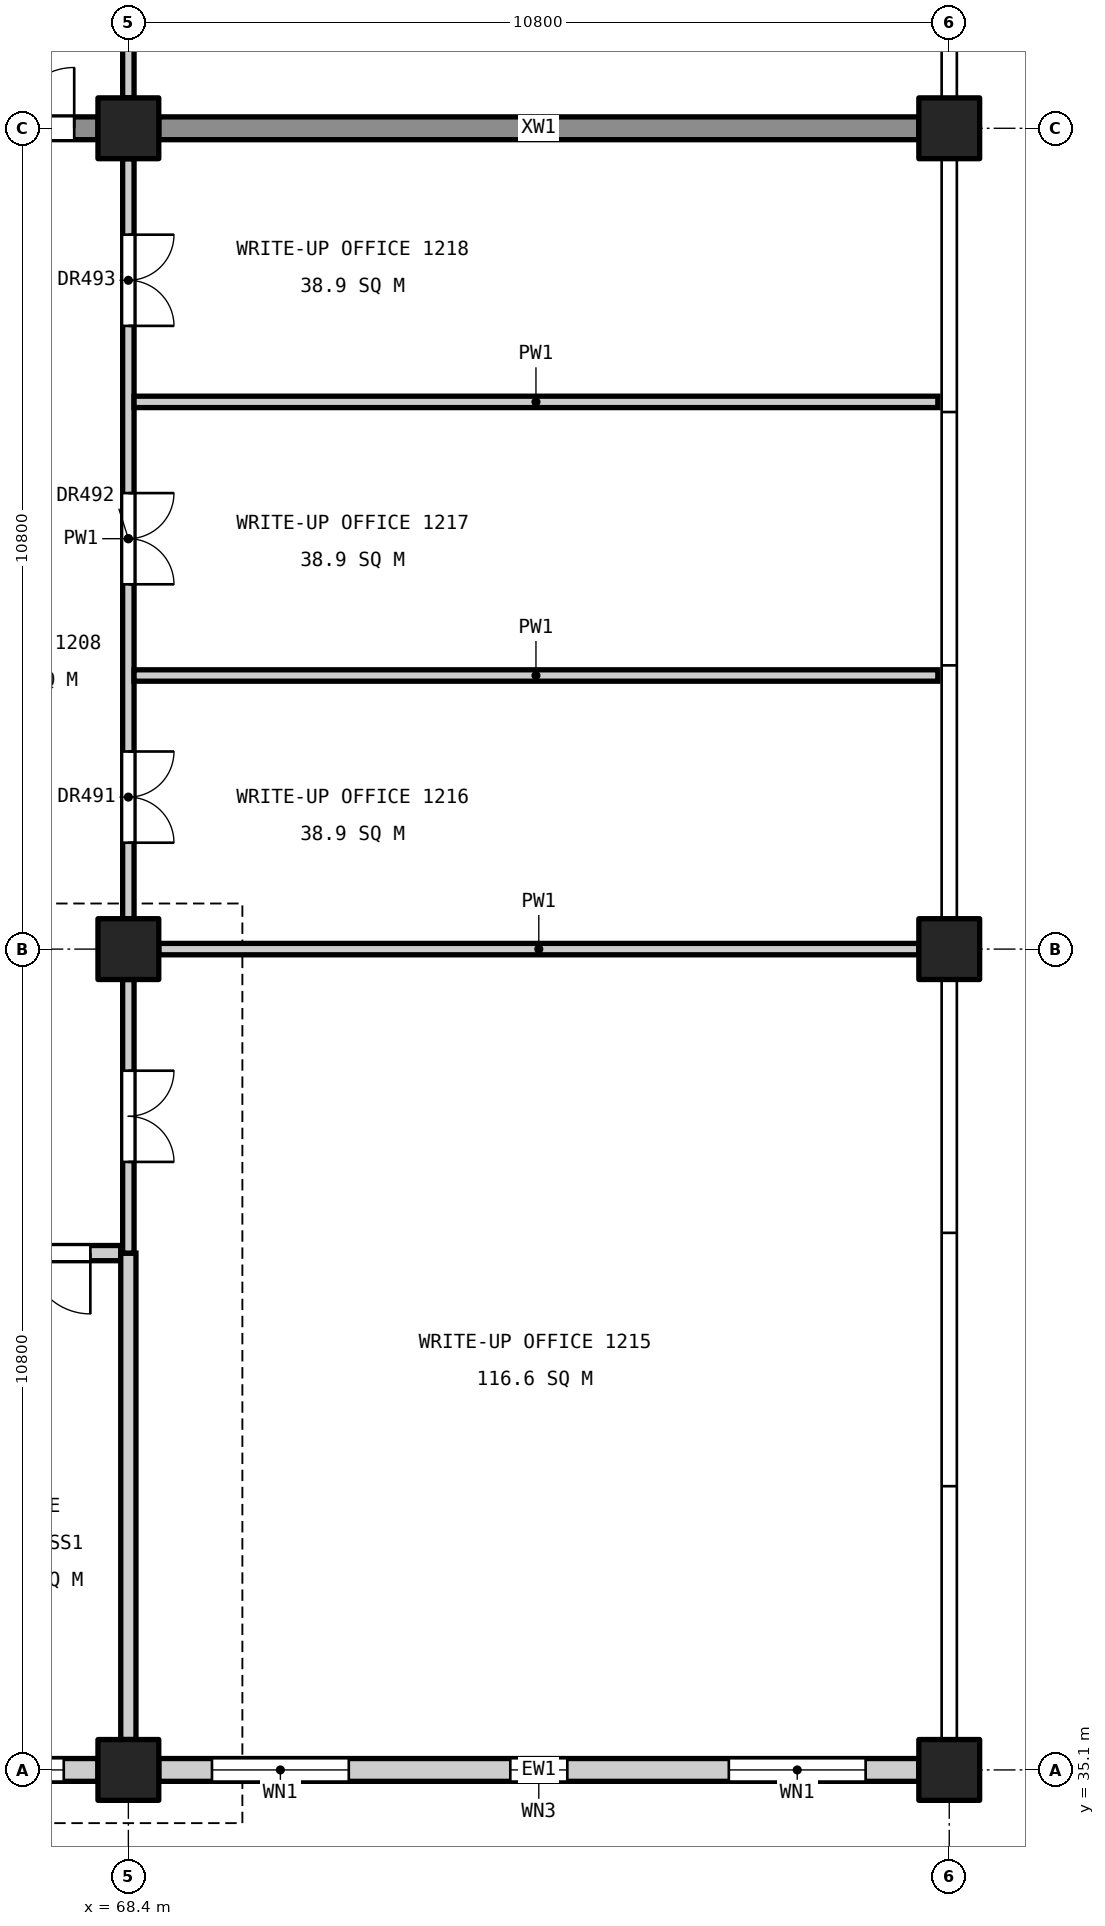
"""IFC4 building model, lengths in metres.
Left out: names, types, materials, properties, quantities, classifications, styles, units other than length and angle.
Written with IfcOpenShell. Run it as: python <this file> out.ifc"""

import sys

from ifc_helpers import new_model, si_unit, direction, frame, frame_2d, origin, origin_2d, place, context, subcontext, project, spatial, rectangle, extrude, element, fill, save


model = new_model("IFC4")
c1 = context("Model", 3, precision=1e-05, world=origin(), true_north=direction((0.0, 1.0)))
c2 = subcontext(c1, "Body", "Model", "MODEL_VIEW")
j1 = project(units=[si_unit("LENGTHUNIT", "METRE"), si_unit("PLANEANGLEUNIT", "RADIAN")], contexts=[c1])
p1 = place(None, origin())
s1 = spatial("IfcSite", under=j1, at=p1, CompositionType="ELEMENT")
p2 = place(p1, origin())
s2 = spatial("IfcBuilding", under=s1, at=p2, CompositionType="ELEMENT")
p3 = place(p2, frame((0.0, 0.0, 60.6)))
s3 = spatial("IfcBuildingStorey", under=s2, at=p3, CompositionType="ELEMENT", Elevation=60.6)
for number, where, z_axis, x_axis in (
    (1, (68.4, 35.1, 0.0), (0.0, 0.0, 1.0), (1.0, 0.0, 0.0)),
    (2, (68.4, 45.9, 0.0), (0.0, 0.0, 1.0), (1.0, 0.0, 0.0)),
    (3, (68.4, 56.7, 0.0), (0.0, 0.0, 1.0), (1.0, 0.0, 0.0)),
    (4, (79.2, 35.1, 0.0), (0.0, 0.0, 1.0), (1.0, 0.0, 0.0)),
    (5, (79.2, 45.9, 0.0), (0.0, 0.0, 1.0), (1.0, 0.0, 0.0)),
    (6, (79.2, 56.7, 0.0), (0.0, 0.0, 1.0), (1.0, 0.0, 0.0)),
):
    element("IfcColumn", number, at=place(p3, frame(where, z_axis=z_axis, x_axis=x_axis)), inside=s3, PredefinedType="COLUMN", context=c2, shape_type="SweptSolid", body=[
        extrude(rectangle(XDim=0.8, YDim=0.8, at=origin_2d()), origin(), (0.0, 0.0, 1.0), 4.8),
    ])
p4 = place(p3, frame((61.6, 56.7, 0.0), z_axis=(0.0, 0.0, 1.0), x_axis=(1.0, 0.0, 0.0)))
e7 = element("IfcWall", 7, at=p4, inside=s3, PredefinedType="SHEAR", context=c2, shape_type="SweptSolid", body=[
    extrude(rectangle(XDim=6.4, YDim=0.3, at=frame_2d((3.2, 0.0))), origin(), (0.0, 0.0, 1.0), 4.55),
])
p5 = place(p4, frame((4.488, 0.0, 0.0)))
e8 = element("IfcOpeningElement", 8, at=p5, cuts=e7, PredefinedType="OPENING", context=c2, shape_type="SweptSolid", body=[
    extrude(rectangle(XDim=1.6, YDim=2.1, at=frame_2d((0.8, 1.05))), frame((0.0, 0.16, 0.0), z_axis=(0.0, -1.0, 0.0), x_axis=(1.0, 0.0, 0.0)), (0.0, 0.0, 1.0), 0.32),
])
p6 = place(p3, frame((68.8, 56.7, 0.0), z_axis=(0.0, 0.0, 1.0), x_axis=(1.0, 0.0, 0.0)))
e9 = element("IfcWall", 9, at=p6, inside=s3, PredefinedType="SHEAR", context=c2, shape_type="SweptSolid", body=[
    extrude(rectangle(XDim=10.0, YDim=0.3, at=frame_2d((5.0, 0.0))), origin(), (0.0, 0.0, 1.0), 4.55),
])
p7 = place(p3, frame((65.9, 35.1, 0.0), z_axis=(0.0, 0.0, 1.0), x_axis=(1.0, 0.0, 0.0)))
e10 = element("IfcWall", 10, at=p7, inside=s3, PredefinedType="STANDARD", context=c2, shape_type="SweptSolid", body=[
    extrude(rectangle(XDim=2.1, YDim=0.3, at=frame_2d((1.05, 0.0))), origin(), (0.0, 0.0, 1.0), 3.85),
])
p8 = place(p7, frame((0.45, 0.0, 0.9)))
e11 = element("IfcOpeningElement", 11, at=p8, cuts=e10, PredefinedType="OPENING", context=c2, shape_type="SweptSolid", body=[
    extrude(rectangle(XDim=1.2, YDim=2.4, at=frame_2d((0.6, 1.2))), frame((0.0, 0.16, 0.0), z_axis=(0.0, -1.0, 0.0), x_axis=(1.0, 0.0, 0.0)), (0.0, 0.0, 1.0), 0.32),
])
p9 = place(p3, frame((68.8, 35.1, 0.0), z_axis=(0.0, 0.0, 1.0), x_axis=(1.0, 0.0, 0.0)))
e12 = element("IfcWall", 12, at=p9, inside=s3, PredefinedType="STANDARD", context=c2, shape_type="SweptSolid", body=[
    extrude(rectangle(XDim=10.0, YDim=0.3, at=frame_2d((5.0, 0.0))), origin(), (0.0, 0.0, 1.0), 3.85),
])
p10 = place(p9, frame((0.7, 0.0, 0.9)))
e13 = element("IfcOpeningElement", 13, at=p10, cuts=e12, PredefinedType="OPENING", context=c2, shape_type="SweptSolid", body=[
    extrude(rectangle(XDim=1.8, YDim=2.4, at=frame_2d((0.9, 1.2))), frame((0.0, 0.16, 0.0), z_axis=(0.0, -1.0, 0.0), x_axis=(1.0, 0.0, 0.0)), (0.0, 0.0, 1.0), 0.32),
])
p11 = place(p9, frame((4.625, 0.0, 0.8)))
e14 = element("IfcOpeningElement", 14, at=p11, cuts=e12, PredefinedType="OPENING", context=c2, shape_type="SweptSolid", body=[
    extrude(rectangle(XDim=0.75, YDim=1.2, at=frame_2d((0.375, 0.6))), frame((0.0, 0.16, 0.0), z_axis=(0.0, -1.0, 0.0), x_axis=(1.0, 0.0, 0.0)), (0.0, 0.0, 1.0), 0.32),
])
p12 = place(p9, frame((7.5, 0.0, 0.9)))
e15 = element("IfcOpeningElement", 15, at=p12, cuts=e12, PredefinedType="OPENING", context=c2, shape_type="SweptSolid", body=[
    extrude(rectangle(XDim=1.8, YDim=2.4, at=frame_2d((0.9, 1.2))), frame((0.0, 0.16, 0.0), z_axis=(0.0, -1.0, 0.0), x_axis=(1.0, 0.0, 0.0)), (0.0, 0.0, 1.0), 0.32),
])
p13 = place(p3, frame((65.9, 41.9, 0.0), z_axis=(0.0, 0.0, 1.0), x_axis=(1.0, 0.0, 0.0)))
e16 = element("IfcWall", 16, at=p13, inside=s3, PredefinedType="PARTITIONING", context=c2, shape_type="SweptSolid", body=[
    extrude(rectangle(XDim=2.4, YDim=0.2, at=frame_2d((1.2, 0.0))), origin(), (0.0, 0.0, 1.0), 3.55),
])
p14 = place(p13, frame((0.4, 0.0, 0.0)))
e17 = element("IfcOpeningElement", 17, at=p14, cuts=e16, PredefinedType="OPENING", context=c2, shape_type="SweptSolid", body=[
    extrude(rectangle(XDim=1.6, YDim=2.1, at=frame_2d((0.8, 1.05))), frame((0.0, 0.11, 0.0), z_axis=(0.0, -1.0, 0.0), x_axis=(1.0, 0.0, 0.0)), (0.0, 0.0, 1.0), 0.22),
])
p15 = place(p3, frame((68.4, 35.5, 0.0), z_axis=(0.0, 0.0, 1.0), x_axis=(0.0, 1.0, 0.0)))
e18 = element("IfcWall", 18, at=p15, inside=s3, PredefinedType="PARTITIONING", context=c2, shape_type="SweptSolid", body=[
    extrude(rectangle(XDim=6.4, YDim=0.2, at=frame_2d((3.2, 0.0))), origin(), (0.0, 0.0, 1.0), 3.55),
])
p16 = place(p3, frame((68.4, 41.9, 0.0), z_axis=(0.0, 0.0, 1.0), x_axis=(0.0, 1.0, 0.0)))
e19 = element("IfcWall", 19, at=p16, inside=s3, PredefinedType="PARTITIONING", context=c2, shape_type="SweptSolid", body=[
    extrude(rectangle(XDim=3.6, YDim=0.15, at=frame_2d((1.8, 0.0))), origin(), (0.0, 0.0, 1.0), 3.55),
])
p17 = place(p16, frame((1.2, 0.0, 0.0)))
e20 = element("IfcOpeningElement", 20, at=p17, cuts=e19, PredefinedType="OPENING", context=c2, shape_type="SweptSolid", body=[
    extrude(rectangle(XDim=1.2, YDim=2.1, at=frame_2d((0.6, 1.05))), frame((0.0, 0.085, 0.0), z_axis=(0.0, -1.0, 0.0), x_axis=(1.0, 0.0, 0.0)), (0.0, 0.0, 1.0), 0.17),
])
p18 = place(p3, frame((68.4, 46.3, 0.0), z_axis=(0.0, 0.0, 1.0), x_axis=(0.0, 1.0, 0.0)))
e21 = element("IfcWall", 21, at=p18, inside=s3, PredefinedType="PARTITIONING", context=c2, shape_type="SweptSolid", body=[
    extrude(rectangle(XDim=10.0, YDim=0.15, at=frame_2d((5.0, 0.0))), origin(), (0.0, 0.0, 1.0), 3.55),
])
p19 = place(p18, frame((1.0, 0.0, 0.0)))
e22 = element("IfcOpeningElement", 22, at=p19, cuts=e21, PredefinedType="OPENING", context=c2, shape_type="SweptSolid", body=[
    extrude(rectangle(XDim=1.2, YDim=2.1, at=frame_2d((0.6, 1.05))), frame((0.0, 0.085, 0.0), z_axis=(0.0, -1.0, 0.0), x_axis=(1.0, 0.0, 0.0)), (0.0, 0.0, 1.0), 0.17),
])
p20 = place(p18, frame((4.4, 0.0, 0.0)))
e23 = element("IfcOpeningElement", 23, at=p20, cuts=e21, PredefinedType="OPENING", context=c2, shape_type="SweptSolid", body=[
    extrude(rectangle(XDim=1.2, YDim=2.1, at=frame_2d((0.6, 1.05))), frame((0.0, 0.085, 0.0), z_axis=(0.0, -1.0, 0.0), x_axis=(1.0, 0.0, 0.0)), (0.0, 0.0, 1.0), 0.17),
])
p21 = place(p18, frame((7.8, 0.0, 0.0)))
e24 = element("IfcOpeningElement", 24, at=p21, cuts=e21, PredefinedType="OPENING", context=c2, shape_type="SweptSolid", body=[
    extrude(rectangle(XDim=1.2, YDim=2.1, at=frame_2d((0.6, 1.05))), frame((0.0, 0.085, 0.0), z_axis=(0.0, -1.0, 0.0), x_axis=(1.0, 0.0, 0.0)), (0.0, 0.0, 1.0), 0.17),
])
p22 = place(p3, frame((68.4, 57.1, 0.0), z_axis=(0.0, 0.0, 1.0), x_axis=(0.0, 1.0, 0.0)))
e25 = element("IfcWall", 25, at=p22, inside=s3, PredefinedType="PARTITIONING", context=c2, shape_type="SweptSolid", body=[
    extrude(rectangle(XDim=3.2, YDim=0.15, at=frame_2d((1.6, 0.0))), origin(), (0.0, 0.0, 1.0), 3.55),
])
p23 = place(p22, frame((1.0, 0.0, 0.0)))
e26 = element("IfcOpeningElement", 26, at=p23, cuts=e25, PredefinedType="OPENING", context=c2, shape_type="SweptSolid", body=[
    extrude(rectangle(XDim=1.2, YDim=2.1, at=frame_2d((0.6, 1.05))), frame((0.0, 0.085, 0.0), z_axis=(0.0, -1.0, 0.0), x_axis=(1.0, 0.0, 0.0)), (0.0, 0.0, 1.0), 0.17),
])
p24 = place(p3, frame((68.8, 45.9, 0.0), z_axis=(0.0, 0.0, 1.0), x_axis=(1.0, 0.0, 0.0)))
e27 = element("IfcWall", 27, at=p24, inside=s3, PredefinedType="PARTITIONING", context=c2, shape_type="SweptSolid", body=[
    extrude(rectangle(XDim=10.0, YDim=0.15, at=frame_2d((5.0, 0.0))), origin(), (0.0, 0.0, 1.0), 3.85),
])
for number, where, z_axis, x_axis in (
    (28, (68.475, 49.5, 0.0), (0.0, 0.0, 1.0), (1.0, 0.0, 0.0)),
    (29, (68.475, 53.1, 0.0), (0.0, 0.0, 1.0), (1.0, 0.0, 0.0)),
):
    element("IfcWall", number, at=place(p3, frame(where, z_axis=z_axis, x_axis=x_axis)), inside=s3, PredefinedType="PARTITIONING", context=c2, shape_type="SweptSolid", body=[
        extrude(rectangle(XDim=10.575, YDim=0.15, at=frame_2d((5.288, 0.0))), origin(), (0.0, 0.0, 1.0), 3.85),
    ])
p25 = place(p8, origin())
e30 = element("IfcWindow", 30, at=p25, inside=s3, PartitioningType="SINGLE_PANEL", PredefinedType="WINDOW", context=c2, shape_type="SweptSolid", body=[
    extrude(rectangle(XDim=1.2, YDim=2.4, at=frame_2d((0.6, 1.2))), frame((0.0, 0.03, 0.0), z_axis=(0.0, -1.0, 0.0), x_axis=(1.0, 0.0, 0.0)), (0.0, 0.0, 1.0), 0.06),
])
fill(e11, e30)
p26 = place(p10, origin())
e31 = element("IfcWindow", 31, at=p26, inside=s3, PartitioningType="SINGLE_PANEL", PredefinedType="WINDOW", context=c2, shape_type="SweptSolid", body=[
    extrude(rectangle(XDim=1.8, YDim=2.4, at=frame_2d((0.9, 1.2))), frame((0.0, 0.03, 0.0), z_axis=(0.0, -1.0, 0.0), x_axis=(1.0, 0.0, 0.0)), (0.0, 0.0, 1.0), 0.06),
])
fill(e13, e31)
p27 = place(p11, origin())
e32 = element("IfcWindow", 32, at=p27, inside=s3, PartitioningType="SINGLE_PANEL", PredefinedType="WINDOW", context=c2, shape_type="SweptSolid", body=[
    extrude(rectangle(XDim=0.75, YDim=1.2, at=frame_2d((0.375, 0.6))), frame((0.0, 0.03, 0.0), z_axis=(0.0, -1.0, 0.0), x_axis=(1.0, 0.0, 0.0)), (0.0, 0.0, 1.0), 0.06),
])
fill(e14, e32)
p28 = place(p12, origin())
e33 = element("IfcWindow", 33, at=p28, inside=s3, PartitioningType="SINGLE_PANEL", PredefinedType="WINDOW", context=c2, shape_type="SweptSolid", body=[
    extrude(rectangle(XDim=1.8, YDim=2.4, at=frame_2d((0.9, 1.2))), frame((0.0, 0.03, 0.0), z_axis=(0.0, -1.0, 0.0), x_axis=(1.0, 0.0, 0.0)), (0.0, 0.0, 1.0), 0.06),
])
fill(e15, e33)
p29 = place(p17, frame((1.2, 0.0, 0.0), z_axis=(0.0, 0.0, 1.0), x_axis=(-1.0, 0.0, 0.0)))
e34 = element("IfcDoor", 34, at=p29, inside=s3, OperationType="DOUBLE_DOOR_SINGLE_SWING", PredefinedType="DOOR", context=c2, shape_type="SweptSolid", body=[
    extrude(rectangle(XDim=1.2, YDim=2.1, at=frame_2d((0.6, 1.05))), frame((0.0, 0.025, 0.0), z_axis=(0.0, -1.0, 0.0), x_axis=(1.0, 0.0, 0.0)), (0.0, 0.0, 1.0), 0.05),
])
fill(e20, e34)
p30 = place(p19, frame((1.2, 0.0, 0.0), z_axis=(0.0, 0.0, 1.0), x_axis=(-1.0, 0.0, 0.0)))
e35 = element("IfcDoor", 35, at=p30, inside=s3, OperationType="DOUBLE_DOOR_SINGLE_SWING", PredefinedType="DOOR", context=c2, shape_type="SweptSolid", body=[
    extrude(rectangle(XDim=1.2, YDim=2.1, at=frame_2d((0.6, 1.05))), frame((0.0, 0.025, 0.0), z_axis=(0.0, -1.0, 0.0), x_axis=(1.0, 0.0, 0.0)), (0.0, 0.0, 1.0), 0.05),
])
fill(e22, e35)
p31 = place(p20, frame((1.2, 0.0, 0.0), z_axis=(0.0, 0.0, 1.0), x_axis=(-1.0, 0.0, 0.0)))
e36 = element("IfcDoor", 36, at=p31, inside=s3, OperationType="DOUBLE_DOOR_SINGLE_SWING", PredefinedType="DOOR", context=c2, shape_type="SweptSolid", body=[
    extrude(rectangle(XDim=1.2, YDim=2.1, at=frame_2d((0.6, 1.05))), frame((0.0, 0.025, 0.0), z_axis=(0.0, -1.0, 0.0), x_axis=(1.0, 0.0, 0.0)), (0.0, 0.0, 1.0), 0.05),
])
fill(e23, e36)
p32 = place(p21, frame((1.2, 0.0, 0.0), z_axis=(0.0, 0.0, 1.0), x_axis=(-1.0, 0.0, 0.0)))
e37 = element("IfcDoor", 37, at=p32, inside=s3, OperationType="DOUBLE_DOOR_SINGLE_SWING", PredefinedType="DOOR", context=c2, shape_type="SweptSolid", body=[
    extrude(rectangle(XDim=1.2, YDim=2.1, at=frame_2d((0.6, 1.05))), frame((0.0, 0.025, 0.0), z_axis=(0.0, -1.0, 0.0), x_axis=(1.0, 0.0, 0.0)), (0.0, 0.0, 1.0), 0.05),
])
fill(e24, e37)
p33 = place(p14, frame((1.6, 0.0, 0.0), z_axis=(0.0, 0.0, 1.0), x_axis=(-1.0, 0.0, 0.0)))
e38 = element("IfcDoor", 38, at=p33, inside=s3, OperationType="DOUBLE_DOOR_SINGLE_SWING", PredefinedType="DOOR", context=c2, shape_type="SweptSolid", body=[
    extrude(rectangle(XDim=1.6, YDim=2.1, at=frame_2d((0.8, 1.05))), frame((0.0, 0.025, 0.0), z_axis=(0.0, -1.0, 0.0), x_axis=(1.0, 0.0, 0.0)), (0.0, 0.0, 1.0), 0.05),
])
fill(e17, e38)
p34 = place(p5, origin())
e39 = element("IfcDoor", 39, at=p34, inside=s3, OperationType="DOUBLE_DOOR_SINGLE_SWING", PredefinedType="DOOR", context=c2, shape_type="SweptSolid", body=[
    extrude(rectangle(XDim=1.6, YDim=2.1, at=frame_2d((0.8, 1.05))), frame((0.0, 0.025, 0.0), z_axis=(0.0, -1.0, 0.0), x_axis=(1.0, 0.0, 0.0)), (0.0, 0.0, 1.0), 0.05),
])
fill(e8, e39)
save(model, sys.argv[1])
